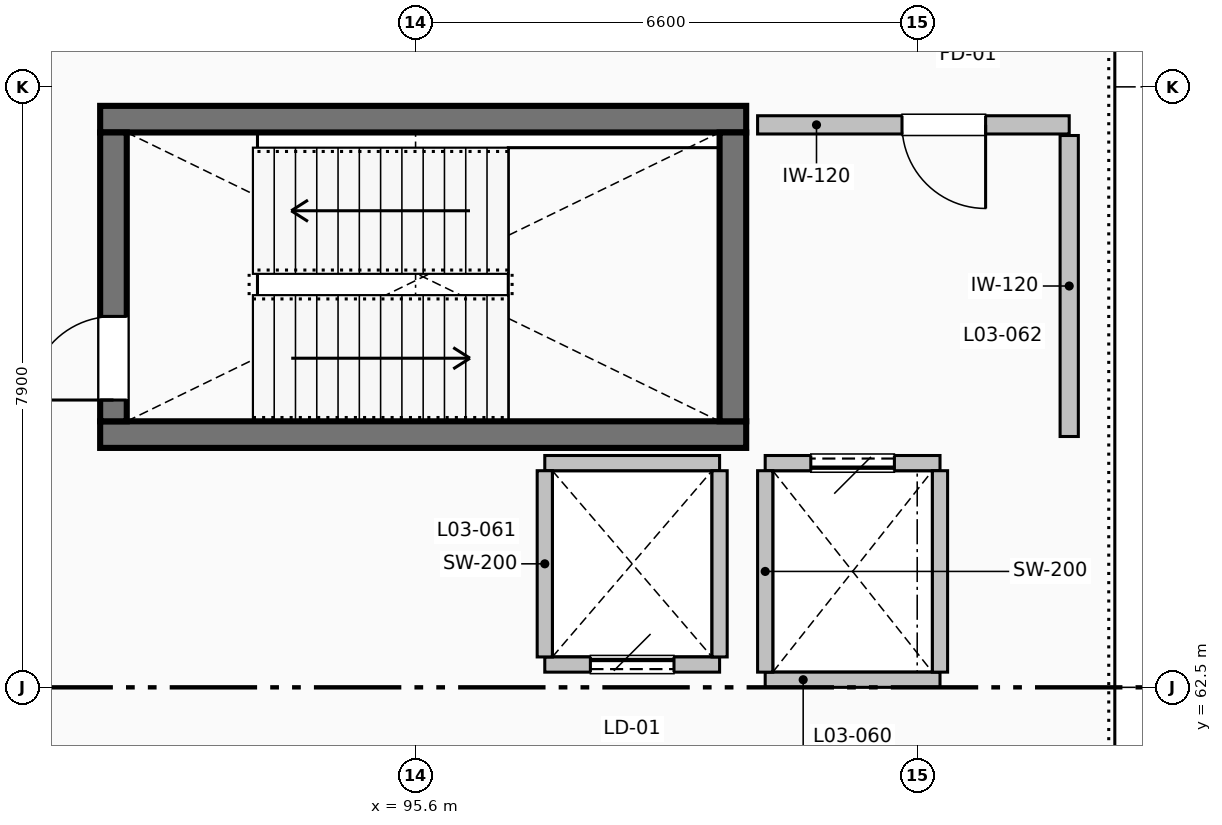
"""IFC4 building model, lengths in metres.
Left out: names, types, materials, properties, quantities, classifications, styles, units other than length and angle.
Written with IfcOpenShell. Run it as: python <this file> out.ifc"""

import sys

from ifc_helpers import new_model, si_unit, direction, frame, frame_2d, origin, place, context, subcontext, project, spatial, rectangle, extrude, element, fill, save


model = new_model("IFC4")
c1 = context("Model", 3, precision=1e-05, world=origin(), true_north=direction((0.0, 1.0)))
c2 = subcontext(c1, "Body", "Model", "MODEL_VIEW")
j1 = project(units=[si_unit("LENGTHUNIT", "METRE"), si_unit("PLANEANGLEUNIT", "RADIAN")], contexts=[c1])
p1 = place(None, origin())
s1 = spatial("IfcSite", under=j1, at=p1, CompositionType="ELEMENT")
p2 = place(p1, origin())
s2 = spatial("IfcBuilding", under=s1, at=p2, CompositionType="ELEMENT")
p3 = place(p2, frame((0.0, 0.0, 15.0)))
s3 = spatial("IfcBuildingStorey", under=s2, at=p3, CompositionType="ELEMENT", Elevation=15.0)
for number, where, z_axis, x_axis in (
    (1, (91.45, 65.825, 0.0), (0.0, 0.0, 1.0), (1.0, 0.0, 0.0)),
    (2, (99.95, 69.975, 0.0), (0.0, 0.0, 1.0), (-1.0, 0.0, 0.0)),
):
    element("IfcWall", number, at=place(p3, frame(where, z_axis=z_axis, x_axis=x_axis)), inside=s3, PredefinedType="SHEAR", context=c2, shape_type="SweptSolid", body=[
        extrude(rectangle(XDim=8.5, YDim=0.35, at=frame_2d((4.25, 0.0))), origin(), (0.0, 0.0, 1.0), 4.22),
    ])
p4 = place(p3, frame((91.625, 66.0, 0.0), z_axis=(0.0, 0.0, 1.0), x_axis=(0.0, 1.0, 0.0)))
e3 = element("IfcWall", 3, at=p4, inside=s3, PredefinedType="SHEAR", context=c2, shape_type="SweptSolid", body=[
    extrude(rectangle(XDim=3.8, YDim=0.35, at=frame_2d((1.9, 0.0))), origin(), (0.0, 0.0, 1.0), 4.22),
])
p5 = place(p4, frame((0.28, 0.0, 0.0)))
e4 = element("IfcOpeningElement", 4, at=p5, cuts=e3, PredefinedType="OPENING", context=c2, shape_type="SweptSolid", body=[
    extrude(rectangle(XDim=1.1, YDim=2.08, at=frame_2d((0.55, 1.04))), frame((0.0, 0.185, 0.0), z_axis=(0.0, -1.0, 0.0), x_axis=(1.0, 0.0, 0.0)), (0.0, 0.0, 1.0), 0.37),
])
p6 = place(p3, frame((99.775, 69.8, 0.0), z_axis=(0.0, 0.0, 1.0), x_axis=(0.0, -1.0, 0.0)))
e5 = element("IfcWall", 5, at=p6, inside=s3, PredefinedType="SHEAR", context=c2, shape_type="SweptSolid", body=[
    extrude(rectangle(XDim=3.8, YDim=0.35, at=frame_2d((1.9, 0.0))), origin(), (0.0, 0.0, 1.0), 4.22),
])
p7 = place(p3, frame((100.2, 62.6, 0.0), z_axis=(0.0, 0.0, 1.0), x_axis=(1.0, 0.0, 0.0)))
e6 = element("IfcWall", 6, at=p7, inside=s3, PredefinedType="PARTITIONING", context=c2, shape_type="SweptSolid", body=[
    extrude(rectangle(XDim=2.3, YDim=0.2, at=frame_2d((1.15, 0.0))), origin(), (0.0, 0.0, 1.0), 4.192),
])
p8 = place(p3, frame((102.5, 65.45, 0.0), z_axis=(0.0, 0.0, 1.0), x_axis=(-1.0, 0.0, 0.0)))
e7 = element("IfcWall", 7, at=p8, inside=s3, PredefinedType="PARTITIONING", context=c2, shape_type="SweptSolid", body=[
    extrude(rectangle(XDim=2.3, YDim=0.2, at=frame_2d((1.15, 0.0))), origin(), (0.0, 0.0, 1.0), 4.192),
])
p9 = place(p8, frame((0.6, 0.0, 0.0)))
e8 = element("IfcOpeningElement", 8, at=p9, cuts=e7, PredefinedType="OPENING", context=c2, shape_type="SweptSolid", body=[
    extrude(rectangle(XDim=1.1, YDim=2.15, at=frame_2d((0.55, 1.075))), frame((0.0, 0.11, 0.0), z_axis=(0.0, -1.0, 0.0), x_axis=(1.0, 0.0, 0.0)), (0.0, 0.0, 1.0), 0.22),
])
for number, where, z_axis, x_axis in (
    (9, (100.2, 62.7, 0.0), (0.0, 0.0, 1.0), (0.0, 1.0, 0.0)),
    (10, (102.5, 65.35, 0.0), (0.0, 0.0, 1.0), (0.0, -1.0, 0.0)),
):
    element("IfcWall", number, at=place(p3, frame(where, z_axis=z_axis, x_axis=x_axis)), inside=s3, PredefinedType="PARTITIONING", context=c2, shape_type="SweptSolid", body=[
        extrude(rectangle(XDim=2.65, YDim=0.2, at=frame_2d((1.325, 0.0))), origin(), (0.0, 0.0, 1.0), 4.192),
    ])
p10 = place(p3, frame((97.3, 62.8, 0.0), z_axis=(0.0, 0.0, 1.0), x_axis=(1.0, 0.0, 0.0)))
e11 = element("IfcWall", 11, at=p10, inside=s3, PredefinedType="PARTITIONING", context=c2, shape_type="SweptSolid", body=[
    extrude(rectangle(XDim=2.3, YDim=0.2, at=frame_2d((1.15, 0.0))), origin(), (0.0, 0.0, 1.0), 4.192),
])
p11 = place(p10, frame((0.6, 0.0, 0.0)))
e12 = element("IfcOpeningElement", 12, at=p11, cuts=e11, PredefinedType="OPENING", context=c2, shape_type="SweptSolid", body=[
    extrude(rectangle(XDim=1.1, YDim=2.15, at=frame_2d((0.55, 1.075))), frame((0.0, 0.11, 0.0), z_axis=(0.0, -1.0, 0.0), x_axis=(1.0, 0.0, 0.0)), (0.0, 0.0, 1.0), 0.22),
])
p12 = place(p3, frame((99.6, 65.45, 0.0), z_axis=(0.0, 0.0, 1.0), x_axis=(-1.0, 0.0, 0.0)))
e13 = element("IfcWall", 13, at=p12, inside=s3, PredefinedType="PARTITIONING", context=c2, shape_type="SweptSolid", body=[
    extrude(rectangle(XDim=2.3, YDim=0.2, at=frame_2d((1.15, 0.0))), origin(), (0.0, 0.0, 1.0), 4.192),
])
for number, where, z_axis, x_axis in (
    (14, (97.3, 62.9, 0.0), (0.0, 0.0, 1.0), (0.0, 1.0, 0.0)),
    (15, (99.6, 65.35, 0.0), (0.0, 0.0, 1.0), (0.0, -1.0, 0.0)),
):
    element("IfcWall", number, at=place(p3, frame(where, z_axis=z_axis, x_axis=x_axis)), inside=s3, PredefinedType="PARTITIONING", context=c2, shape_type="SweptSolid", body=[
        extrude(rectangle(XDim=2.45, YDim=0.2, at=frame_2d((1.225, 0.0))), origin(), (0.0, 0.0, 1.0), 4.192),
    ])
p13 = place(p3, frame((104.2, 69.9, 0.0), z_axis=(0.0, 0.0, 1.0), x_axis=(-1.0, 0.0, 0.0)))
e16 = element("IfcWall", 16, at=p13, inside=s3, PredefinedType="PARTITIONING", context=c2, shape_type="SweptSolid", body=[
    extrude(rectangle(XDim=4.1, YDim=0.24, at=frame_2d((2.05, 0.0))), origin(), (0.0, 0.0, 1.0), 4.192),
])
p14 = place(p13, frame((1.1, 0.0, 0.0)))
e17 = element("IfcOpeningElement", 17, at=p14, cuts=e16, PredefinedType="OPENING", context=c2, shape_type="SweptSolid", body=[
    extrude(rectangle(XDim=1.1, YDim=2.08, at=frame_2d((0.55, 1.04))), frame((0.0, 0.13, 0.0), z_axis=(0.0, -1.0, 0.0), x_axis=(1.0, 0.0, 0.0)), (0.0, 0.0, 1.0), 0.26),
])
p15 = place(p3, frame((104.2, 69.76, 0.0), z_axis=(0.0, 0.0, 1.0), x_axis=(0.0, -1.0, 0.0)))
e18 = element("IfcWall", 18, at=p15, inside=s3, PredefinedType="PARTITIONING", context=c2, shape_type="SweptSolid", body=[
    extrude(rectangle(XDim=3.96, YDim=0.24, at=frame_2d((1.98, 0.0))), origin(), (0.0, 0.0, 1.0), 4.192),
])
p16 = place(p5, origin())
e19 = element("IfcDoor", 19, at=p16, inside=s3, OperationType="SINGLE_SWING_LEFT", PredefinedType="DOOR", context=c2, shape_type="SweptSolid", body=[
    extrude(rectangle(XDim=1.1, YDim=2.08, at=frame_2d((0.55, 1.04))), frame((0.0, 0.025, 0.0), z_axis=(0.0, -1.0, 0.0), x_axis=(1.0, 0.0, 0.0)), (0.0, 0.0, 1.0), 0.05),
])
fill(e4, e19)
p17 = place(p9, origin())
e20 = element("IfcDoor", 20, at=p17, inside=s3, OperationType="SLIDING_TO_LEFT", PredefinedType="DOOR", context=c2, shape_type="SweptSolid", body=[
    extrude(rectangle(XDim=1.1, YDim=2.15, at=frame_2d((0.55, 1.075))), frame((0.0, 0.025, 0.0), z_axis=(0.0, -1.0, 0.0), x_axis=(1.0, 0.0, 0.0)), (0.0, 0.0, 1.0), 0.05),
])
fill(e8, e20)
p18 = place(p11, origin())
e21 = element("IfcDoor", 21, at=p18, inside=s3, OperationType="SLIDING_TO_LEFT", PredefinedType="DOOR", context=c2, shape_type="SweptSolid", body=[
    extrude(rectangle(XDim=1.1, YDim=2.15, at=frame_2d((0.55, 1.075))), frame((0.0, 0.025, 0.0), z_axis=(0.0, -1.0, 0.0), x_axis=(1.0, 0.0, 0.0)), (0.0, 0.0, 1.0), 0.05),
])
fill(e12, e21)
p19 = place(p14, origin())
e22 = element("IfcDoor", 22, at=p19, inside=s3, OperationType="SINGLE_SWING_LEFT", PredefinedType="DOOR", context=c2, shape_type="SweptSolid", body=[
    extrude(rectangle(XDim=1.1, YDim=2.08, at=frame_2d((0.55, 1.04))), frame((0.0, 0.025, 0.0), z_axis=(0.0, -1.0, 0.0), x_axis=(1.0, 0.0, 0.0)), (0.0, 0.0, 1.0), 0.05),
])
fill(e17, e22)
save(model, sys.argv[1])
